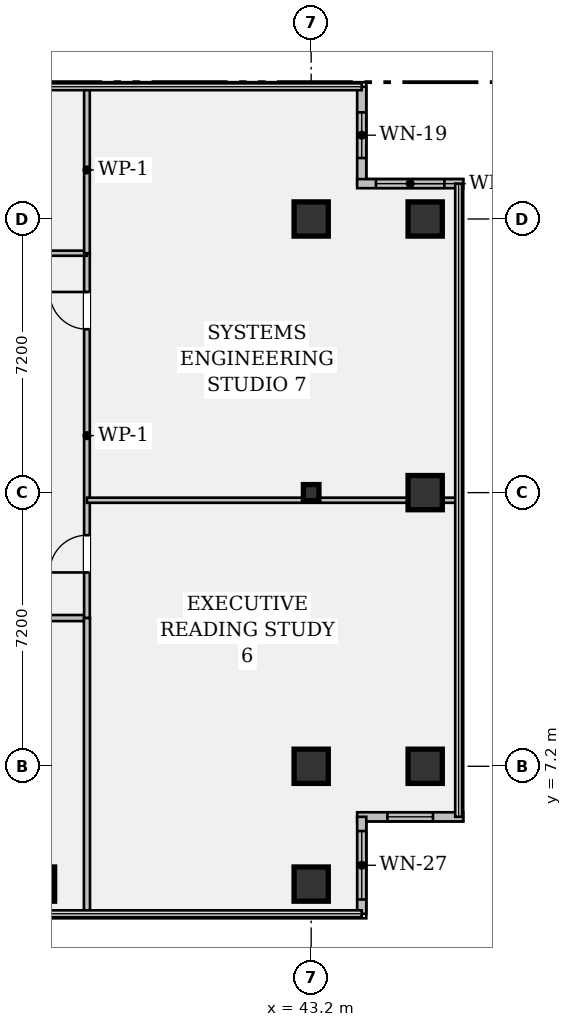
"""IFC4 building model, lengths in metres.
Left out: names, types, materials, properties, quantities, classifications, styles, units other than length and angle.
Written with IfcOpenShell. Run it as: python <this file> out.ifc"""

import sys

from ifc_helpers import new_model, si_unit, direction, frame, frame_2d, origin, origin_2d, place, context, subcontext, project, spatial, rectangle, hollow_rectangle, i_section, extrude, element, fill, save


model = new_model("IFC4")
c1 = context("Model", 3, precision=1e-05, world=origin(), true_north=direction((0.0, 1.0)))
c2 = subcontext(c1, "Body", "Model", "MODEL_VIEW")
j1 = project(units=[si_unit("LENGTHUNIT", "METRE"), si_unit("PLANEANGLEUNIT", "RADIAN")], contexts=[c1])
p1 = place(None, origin())
s1 = spatial("IfcSite", under=j1, at=p1, CompositionType="ELEMENT")
p2 = place(p1, origin())
s2 = spatial("IfcBuilding", under=s1, at=p2, CompositionType="ELEMENT")
p3 = place(p2, frame((0.0, 0.0, 129.15)))
s3 = spatial("IfcBuildingStorey", under=s2, at=p3, CompositionType="ELEMENT", Elevation=129.15)
for number, where, z_axis, x_axis in (
    (1, (36.0, 4.1, 0.0), (0.0, 0.0, 1.0), (1.0, 0.0, 0.0)),
    (2, (43.2, 4.1, 0.0), (0.0, 0.0, 1.0), (1.0, 0.0, 0.0)),
    (3, (43.2, 7.2, 0.0), (0.0, 0.0, 1.0), (1.0, 0.0, 0.0)),
):
    element("IfcColumn", number, at=place(p3, frame(where, z_axis=z_axis, x_axis=x_axis)), inside=s3, PredefinedType="COLUMN", context=c2, shape_type="SweptSolid", body=[
        extrude(hollow_rectangle(XDim=0.9, YDim=0.9, WallThickness=0.055, at=origin_2d()), origin(), (0.0, 0.0, 1.0), 3.58),
    ])
p4 = place(p3, frame((43.2, 14.4, 0.0), z_axis=(0.0, 0.0, 1.0), x_axis=(1.0, 0.0, 0.0)))
e4 = element("IfcColumn", 4, at=p4, inside=s3, PredefinedType="COLUMN", context=c2, shape_type="SweptSolid", body=[
    extrude(i_section(OverallWidth=0.409, OverallDepth=0.424, WebThickness=0.033, FlangeThickness=0.052, FilletRadius=0.018, at=origin_2d()), origin(), (0.0, 0.0, 1.0), 3.58),
])
for number, where, z_axis, x_axis in (
    (5, (43.2, 21.6, 0.0), (0.0, 0.0, 1.0), (1.0, 0.0, 0.0)),
    (6, (46.2, 7.2, 0.0), (0.0, 0.0, 1.0), (1.0, 0.0, 0.0)),
    (7, (46.2, 14.4, 0.0), (0.0, 0.0, 1.0), (1.0, 0.0, 0.0)),
    (8, (46.2, 21.6, 0.0), (0.0, 0.0, 1.0), (1.0, 0.0, 0.0)),
):
    element("IfcColumn", number, at=place(p3, frame(where, z_axis=z_axis, x_axis=x_axis)), inside=s3, PredefinedType="COLUMN", context=c2, shape_type="SweptSolid", body=[
        extrude(hollow_rectangle(XDim=0.9, YDim=0.9, WallThickness=0.055, at=origin_2d()), origin(), (0.0, 0.0, 1.0), 3.58),
    ])
p5 = place(p3, frame((44.53, 25.08, 0.0), z_axis=(0.0, 0.0, 1.0), x_axis=(0.0, -1.0, 0.0)))
e9 = element("IfcWall", 9, at=p5, inside=s3, PredefinedType="STANDARD", context=c2, shape_type="SweptSolid", body=[
    extrude(rectangle(XDim=2.55, YDim=0.24, at=frame_2d((1.275, 0.0))), origin(), (0.0, 0.0, 1.0), 3.58),
])
p6 = place(p5, frame((0.675, 0.0, 0.95)))
e10 = element("IfcOpeningElement", 10, at=p6, cuts=e9, PredefinedType="OPENING", context=c2, shape_type="SweptSolid", body=[
    extrude(rectangle(XDim=1.2, YDim=1.8, at=frame_2d((0.6, 0.9))), frame((0.0, 0.132, 0.0), z_axis=(0.0, -1.0, 0.0), x_axis=(1.0, 0.0, 0.0)), (0.0, 0.0, 1.0), 0.264),
])
p7 = place(p3, frame((44.41, 22.53, 0.0), z_axis=(0.0, 0.0, 1.0), x_axis=(1.0, 0.0, 0.0)))
e11 = element("IfcWall", 11, at=p7, inside=s3, PredefinedType="STANDARD", context=c2, shape_type="SweptSolid", body=[
    extrude(rectangle(XDim=2.79, YDim=0.24, at=frame_2d((1.395, 0.0))), origin(), (0.0, 0.0, 1.0), 3.58),
])
p8 = place(p7, frame((0.495, 0.0, 0.95)))
e12 = element("IfcOpeningElement", 12, at=p8, cuts=e11, PredefinedType="OPENING", context=c2, shape_type="SweptSolid", body=[
    extrude(rectangle(XDim=1.8, YDim=1.35, at=frame_2d((0.9, 0.675))), frame((0.0, 0.132, 0.0), z_axis=(0.0, -1.0, 0.0), x_axis=(1.0, 0.0, 0.0)), (0.0, 0.0, 1.0), 0.264),
])
p9 = place(p3, frame((47.2, 5.87, 0.0), z_axis=(0.0, 0.0, 1.0), x_axis=(-1.0, 0.0, 0.0)))
e13 = element("IfcWall", 13, at=p9, inside=s3, PredefinedType="STANDARD", context=c2, shape_type="SweptSolid", body=[
    extrude(rectangle(XDim=2.79, YDim=0.24, at=frame_2d((1.395, 0.0))), origin(), (0.0, 0.0, 1.0), 3.58),
])
p10 = place(p9, frame((0.795, 0.0, 0.95)))
e14 = element("IfcOpeningElement", 14, at=p10, cuts=e13, PredefinedType="OPENING", context=c2, shape_type="SweptSolid", body=[
    extrude(rectangle(XDim=1.2, YDim=1.8, at=frame_2d((0.6, 0.9))), frame((0.0, 0.132, 0.0), z_axis=(0.0, -1.0, 0.0), x_axis=(1.0, 0.0, 0.0)), (0.0, 0.0, 1.0), 0.264),
])
p11 = place(p3, frame((44.53, 5.87, 0.0), z_axis=(0.0, 0.0, 1.0), x_axis=(0.0, -1.0, 0.0)))
e15 = element("IfcWall", 15, at=p11, inside=s3, PredefinedType="STANDARD", context=c2, shape_type="SweptSolid", body=[
    extrude(rectangle(XDim=2.55, YDim=0.24, at=frame_2d((1.275, 0.0))), origin(), (0.0, 0.0, 1.0), 3.58),
])
p12 = place(p11, frame((0.375, 0.0, 0.95)))
e16 = element("IfcOpeningElement", 16, at=p12, cuts=e15, PredefinedType="OPENING", context=c2, shape_type="SweptSolid", body=[
    extrude(rectangle(XDim=1.8, YDim=1.35, at=frame_2d((0.9, 0.675))), frame((0.0, 0.132, 0.0), z_axis=(0.0, -1.0, 0.0), x_axis=(1.0, 0.0, 0.0)), (0.0, 0.0, 1.0), 0.264),
])
p13 = place(p3, frame((17.35, 11.1, 0.0), z_axis=(0.0, 0.0, 1.0), x_axis=(1.0, 0.0, 0.0)))
e17 = element("IfcWall", 17, at=p13, inside=s3, PredefinedType="PARTITIONING", context=c2, shape_type="SweptSolid", body=[
    extrude(rectangle(XDim=19.95, YDim=0.16, at=frame_2d((9.975, 0.0))), origin(), (0.0, 0.0, 1.0), 2.869),
])
p14 = place(p13, frame((2.52, 0.0, 0.0)))
e18 = element("IfcOpeningElement", 18, at=p14, cuts=e17, PredefinedType="OPENING", context=c2, shape_type="SweptSolid", body=[
    extrude(rectangle(XDim=0.98, YDim=2.15, at=frame_2d((0.49, 1.075))), frame((0.0, 0.092, 0.0), z_axis=(0.0, -1.0, 0.0), x_axis=(1.0, 0.0, 0.0)), (0.0, 0.0, 1.0), 0.184),
])
p15 = place(p13, frame((9.15, 0.0, 0.0)))
e19 = element("IfcOpeningElement", 19, at=p15, cuts=e17, PredefinedType="OPENING", context=c2, shape_type="SweptSolid", body=[
    extrude(rectangle(XDim=0.98, YDim=2.15, at=frame_2d((0.49, 1.075))), frame((0.0, 0.092, 0.0), z_axis=(0.0, -1.0, 0.0), x_axis=(1.0, 0.0, 0.0)), (0.0, 0.0, 1.0), 0.184),
])
p16 = place(p13, frame((16.1, 0.0, 0.0)))
e20 = element("IfcOpeningElement", 20, at=p16, cuts=e17, PredefinedType="OPENING", context=c2, shape_type="SweptSolid", body=[
    extrude(rectangle(XDim=0.98, YDim=2.15, at=frame_2d((0.49, 1.075))), frame((0.0, 0.092, 0.0), z_axis=(0.0, -1.0, 0.0), x_axis=(1.0, 0.0, 0.0)), (0.0, 0.0, 1.0), 0.184),
])
p17 = place(p3, frame((37.3, 11.1, 0.0), z_axis=(0.0, 0.0, 1.0), x_axis=(0.0, 1.0, 0.0)))
e21 = element("IfcWall", 21, at=p17, inside=s3, PredefinedType="PARTITIONING", context=c2, shape_type="SweptSolid", body=[
    extrude(rectangle(XDim=9.6, YDim=0.15, at=frame_2d((4.8, 0.0))), origin(), (0.0, 0.0, 1.0), 2.869),
])
p18 = place(p17, frame((1.2, 0.0, 0.0)))
e22 = element("IfcOpeningElement", 22, at=p18, cuts=e21, PredefinedType="OPENING", context=c2, shape_type="SweptSolid", body=[
    extrude(rectangle(XDim=0.98, YDim=2.15, at=frame_2d((0.49, 1.075))), frame((0.0, 0.087, 0.0), z_axis=(0.0, -1.0, 0.0), x_axis=(1.0, 0.0, 0.0)), (0.0, 0.0, 1.0), 0.174),
])
p19 = place(p17, frame((7.6, 0.0, 0.0)))
e23 = element("IfcOpeningElement", 23, at=p19, cuts=e21, PredefinedType="OPENING", context=c2, shape_type="SweptSolid", body=[
    extrude(rectangle(XDim=0.98, YDim=2.15, at=frame_2d((0.49, 1.075))), frame((0.0, 0.087, 0.0), z_axis=(0.0, -1.0, 0.0), x_axis=(1.0, 0.0, 0.0)), (0.0, 0.0, 1.0), 0.174),
])
p20 = place(p3, frame((17.35, 20.7, 0.0), z_axis=(0.0, 0.0, 1.0), x_axis=(1.0, 0.0, 0.0)))
e24 = element("IfcWall", 24, at=p20, inside=s3, PredefinedType="PARTITIONING", context=c2, shape_type="SweptSolid", body=[
    extrude(rectangle(XDim=19.95, YDim=0.135, at=frame_2d((9.975, 0.0))), origin(), (0.0, 0.0, 1.0), 2.869),
])
p21 = place(p20, frame((5.52, 0.0, 0.0)))
e25 = element("IfcOpeningElement", 25, at=p21, cuts=e24, PredefinedType="OPENING", context=c2, shape_type="SweptSolid", body=[
    extrude(rectangle(XDim=1.0, YDim=2.15, at=frame_2d((0.5, 1.075))), frame((0.0, 0.08, 0.0), z_axis=(0.0, -1.0, 0.0), x_axis=(1.0, 0.0, 0.0)), (0.0, 0.0, 1.0), 0.159),
])
p22 = place(p20, frame((9.21, 0.0, 0.0)))
e26 = element("IfcOpeningElement", 26, at=p22, cuts=e24, PredefinedType="OPENING", context=c2, shape_type="SweptSolid", body=[
    extrude(rectangle(XDim=0.98, YDim=2.15, at=frame_2d((0.49, 1.075))), frame((0.0, 0.08, 0.0), z_axis=(0.0, -1.0, 0.0), x_axis=(1.0, 0.0, 0.0)), (0.0, 0.0, 1.0), 0.159),
])
p23 = place(p3, frame((37.3, 3.32, 0.0), z_axis=(0.0, 0.0, 1.0), x_axis=(0.0, 1.0, 0.0)))
e27 = element("IfcWall", 27, at=p23, inside=s3, PredefinedType="PARTITIONING", context=c2, shape_type="SweptSolid", body=[
    extrude(rectangle(XDim=7.78, YDim=0.16, at=frame_2d((3.89, 0.0))), origin(), (0.0, 0.0, 1.0), 2.869),
])
p24 = place(p3, frame((37.3, 20.7, 0.0), z_axis=(0.0, 0.0, 1.0), x_axis=(0.0, 1.0, 0.0)))
e28 = element("IfcWall", 28, at=p24, inside=s3, PredefinedType="PARTITIONING", context=c2, shape_type="SweptSolid", body=[
    extrude(rectangle(XDim=4.38, YDim=0.15, at=frame_2d((2.19, 0.0))), origin(), (0.0, 0.0, 1.0), 2.869),
])
p25 = place(p3, frame((37.3, 14.2, 0.0), z_axis=(0.0, 0.0, 1.0), x_axis=(1.0, 0.0, 0.0)))
e29 = element("IfcWall", 29, at=p25, inside=s3, PredefinedType="PARTITIONING", context=c2, shape_type="SweptSolid", body=[
    extrude(rectangle(XDim=9.78, YDim=0.135, at=frame_2d((4.89, 0.0))), origin(), (0.0, 0.0, 1.0), 2.869),
])
p26 = place(p6, origin())
e30 = element("IfcWindow", 30, at=p26, inside=s3, PartitioningType="SINGLE_PANEL", PredefinedType="WINDOW", context=c2, shape_type="SweptSolid", body=[
    extrude(rectangle(XDim=1.2, YDim=1.8, at=frame_2d((0.6, 0.9))), frame((0.0, 0.03, 0.0), z_axis=(0.0, -1.0, 0.0), x_axis=(1.0, 0.0, 0.0)), (0.0, 0.0, 1.0), 0.06),
])
fill(e10, e30)
p27 = place(p8, origin())
e31 = element("IfcWindow", 31, at=p27, inside=s3, PartitioningType="SINGLE_PANEL", PredefinedType="WINDOW", context=c2, shape_type="SweptSolid", body=[
    extrude(rectangle(XDim=1.8, YDim=1.35, at=frame_2d((0.9, 0.675))), frame((0.0, 0.03, 0.0), z_axis=(0.0, -1.0, 0.0), x_axis=(1.0, 0.0, 0.0)), (0.0, 0.0, 1.0), 0.06),
])
fill(e12, e31)
p28 = place(p10, origin())
e32 = element("IfcWindow", 32, at=p28, inside=s3, PartitioningType="SINGLE_PANEL", PredefinedType="WINDOW", context=c2, shape_type="SweptSolid", body=[
    extrude(rectangle(XDim=1.2, YDim=1.8, at=frame_2d((0.6, 0.9))), frame((0.0, 0.03, 0.0), z_axis=(0.0, -1.0, 0.0), x_axis=(1.0, 0.0, 0.0)), (0.0, 0.0, 1.0), 0.06),
])
fill(e14, e32)
p29 = place(p12, origin())
e33 = element("IfcWindow", 33, at=p29, inside=s3, PartitioningType="SINGLE_PANEL", PredefinedType="WINDOW", context=c2, shape_type="SweptSolid", body=[
    extrude(rectangle(XDim=1.8, YDim=1.35, at=frame_2d((0.9, 0.675))), frame((0.0, 0.03, 0.0), z_axis=(0.0, -1.0, 0.0), x_axis=(1.0, 0.0, 0.0)), (0.0, 0.0, 1.0), 0.06),
])
fill(e16, e33)
p30 = place(p18, origin())
e34 = element("IfcDoor", 34, at=p30, inside=s3, OperationType="SINGLE_SWING_LEFT", PredefinedType="DOOR", context=c2, shape_type="SweptSolid", body=[
    extrude(rectangle(XDim=0.98, YDim=2.15, at=frame_2d((0.49, 1.075))), frame((0.0, 0.025, 0.0), z_axis=(0.0, -1.0, 0.0), x_axis=(1.0, 0.0, 0.0)), (0.0, 0.0, 1.0), 0.05),
])
fill(e22, e34)
p31 = place(p19, origin())
e35 = element("IfcDoor", 35, at=p31, inside=s3, OperationType="SINGLE_SWING_RIGHT", PredefinedType="DOOR", context=c2, shape_type="SweptSolid", body=[
    extrude(rectangle(XDim=0.98, YDim=2.15, at=frame_2d((0.49, 1.075))), frame((0.0, 0.025, 0.0), z_axis=(0.0, -1.0, 0.0), x_axis=(1.0, 0.0, 0.0)), (0.0, 0.0, 1.0), 0.05),
])
fill(e23, e35)
save(model, sys.argv[1])
